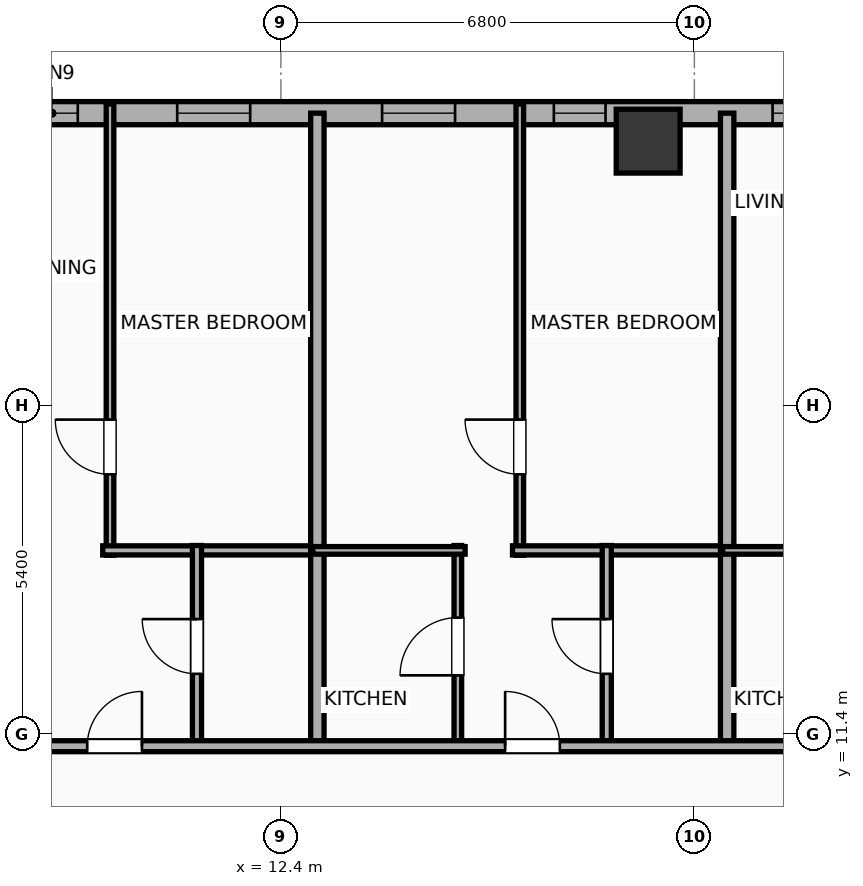
"""IFC4 building model, lengths in metres.
Left out: names, types, materials, properties, quantities, classifications, styles, units other than length and angle.
Written with IfcOpenShell. Run it as: python <this file> out.ifc"""

import sys

from ifc_helpers import new_model, si_unit, direction, frame, frame_2d, origin, origin_2d, place, context, subcontext, project, spatial, rectangle, hollow_rectangle, extrude, element, fill, save


model = new_model("IFC4")
c1 = context("Model", 3, precision=1e-05, world=origin(), true_north=direction((0.0, 1.0)))
c2 = subcontext(c1, "Body", "Model", "MODEL_VIEW")
j1 = project(units=[si_unit("LENGTHUNIT", "METRE"), si_unit("PLANEANGLEUNIT", "RADIAN")], contexts=[c1])
p1 = place(None, origin())
s1 = spatial("IfcSite", under=j1, at=p1, CompositionType="ELEMENT")
p2 = place(p1, origin())
s2 = spatial("IfcBuilding", under=s1, at=p2, CompositionType="ELEMENT")
p3 = place(p2, frame((0.0, 0.0, 120.9)))
s3 = spatial("IfcBuildingStorey", under=s2, at=p3, CompositionType="ELEMENT", Elevation=120.9)
p4 = place(p3, frame((18.44, 21.15, 0.0), z_axis=(0.0, 0.0, 1.0), x_axis=(1.0, 0.0, 0.0)))
e1 = element("IfcColumn", 1, at=p4, inside=s3, PredefinedType="COLUMN", context=c2, shape_type="SweptSolid", body=[
    extrude(hollow_rectangle(XDim=1.05, YDim=1.05, WallThickness=0.036, at=origin_2d()), origin(), (0.0, 0.0, 1.0), 3.9),
])
p5 = place(p3, frame((-25.381, 21.61, 0.0), z_axis=(0.0, 0.0, 1.0), x_axis=(1.0, 0.0, 0.0)))
e2 = element("IfcWall", 2, at=p5, inside=s3, PredefinedType="ELEMENTEDWALL", context=c2, shape_type="SweptSolid", body=[
    extrude(rectangle(XDim=54.763, YDim=0.38, at=frame_2d((27.381, 0.0))), origin(), (0.0, 0.0, 1.0), 3.65),
])
p6 = place(p5, frame((7.295, 0.0, 0.75)))
e3 = element("IfcOpeningElement", 3, at=p6, cuts=e2, PredefinedType="OPENING", context=c2, shape_type="SweptSolid", body=[
    extrude(rectangle(XDim=2.4, YDim=2.1, at=frame_2d((1.2, 1.05))), frame((0.0, 0.2, 0.0), z_axis=(0.0, -1.0, 0.0), x_axis=(1.0, 0.0, 0.0)), (0.0, 0.0, 1.0), 0.4),
])
p7 = place(p5, frame((17.686, 0.0, 0.75)))
e4 = element("IfcOpeningElement", 4, at=p7, cuts=e2, PredefinedType="OPENING", context=c2, shape_type="SweptSolid", body=[
    extrude(rectangle(XDim=2.4, YDim=2.1, at=frame_2d((1.2, 1.05))), frame((0.0, 0.2, 0.0), z_axis=(0.0, -1.0, 0.0), x_axis=(1.0, 0.0, 0.0)), (0.0, 0.0, 1.0), 0.4),
])
p8 = place(p5, frame((45.867, 0.0, 0.75)))
e5 = element("IfcOpeningElement", 5, at=p8, cuts=e2, PredefinedType="OPENING", context=c2, shape_type="SweptSolid", body=[
    extrude(rectangle(XDim=2.4, YDim=2.1, at=frame_2d((1.2, 1.05))), frame((0.0, 0.2, 0.0), z_axis=(0.0, -1.0, 0.0), x_axis=(1.0, 0.0, 0.0)), (0.0, 0.0, 1.0), 0.4),
])
p9 = place(p5, frame((1.481, 0.0, 0.75)))
e6 = element("IfcOpeningElement", 6, at=p9, cuts=e2, PredefinedType="OPENING", context=c2, shape_type="SweptSolid", body=[
    extrude(rectangle(XDim=1.2, YDim=2.05, at=frame_2d((0.6, 1.025))), frame((0.0, 0.2, 0.0), z_axis=(0.0, -1.0, 0.0), x_axis=(1.0, 0.0, 0.0)), (0.0, 0.0, 1.0), 0.4),
])
p10 = place(p5, frame((4.522, 0.0, 0.75)))
e7 = element("IfcOpeningElement", 7, at=p10, cuts=e2, PredefinedType="OPENING", context=c2, shape_type="SweptSolid", body=[
    extrude(rectangle(XDim=1.2, YDim=2.05, at=frame_2d((0.6, 1.025))), frame((0.0, 0.2, 0.0), z_axis=(0.0, -1.0, 0.0), x_axis=(1.0, 0.0, 0.0)), (0.0, 0.0, 1.0), 0.4),
])
p11 = place(p5, frame((11.696, 0.0, 0.75)))
e8 = element("IfcOpeningElement", 8, at=p11, cuts=e2, PredefinedType="OPENING", context=c2, shape_type="SweptSolid", body=[
    extrude(rectangle(XDim=1.2, YDim=2.05, at=frame_2d((0.6, 1.025))), frame((0.0, 0.2, 0.0), z_axis=(0.0, -1.0, 0.0), x_axis=(1.0, 0.0, 0.0)), (0.0, 0.0, 1.0), 0.4),
])
p12 = place(p5, frame((15.076, 0.0, 0.75)))
e9 = element("IfcOpeningElement", 9, at=p12, cuts=e2, PredefinedType="OPENING", context=c2, shape_type="SweptSolid", body=[
    extrude(rectangle(XDim=1.2, YDim=2.05, at=frame_2d((0.6, 1.025))), frame((0.0, 0.2, 0.0), z_axis=(0.0, -1.0, 0.0), x_axis=(1.0, 0.0, 0.0)), (0.0, 0.0, 1.0), 0.4),
])
p13 = place(p5, frame((22.676, 0.0, 0.75)))
e10 = element("IfcOpeningElement", 10, at=p13, cuts=e2, PredefinedType="OPENING", context=c2, shape_type="SweptSolid", body=[
    extrude(rectangle(XDim=1.2, YDim=2.05, at=frame_2d((0.6, 1.025))), frame((0.0, 0.2, 0.0), z_axis=(0.0, -1.0, 0.0), x_axis=(1.0, 0.0, 0.0)), (0.0, 0.0, 1.0), 0.4),
])
p14 = place(p5, frame((25.576, 0.0, 0.75)))
e11 = element("IfcOpeningElement", 11, at=p14, cuts=e2, PredefinedType="OPENING", context=c2, shape_type="SweptSolid", body=[
    extrude(rectangle(XDim=1.2, YDim=2.05, at=frame_2d((0.6, 1.025))), frame((0.0, 0.2, 0.0), z_axis=(0.0, -1.0, 0.0), x_axis=(1.0, 0.0, 0.0)), (0.0, 0.0, 1.0), 0.4),
])
p15 = place(p5, frame((29.076, 0.0, 0.75)))
e12 = element("IfcOpeningElement", 12, at=p15, cuts=e2, PredefinedType="OPENING", context=c2, shape_type="SweptSolid", body=[
    extrude(rectangle(XDim=1.2, YDim=2.05, at=frame_2d((0.6, 1.025))), frame((0.0, 0.2, 0.0), z_axis=(0.0, -1.0, 0.0), x_axis=(1.0, 0.0, 0.0)), (0.0, 0.0, 1.0), 0.4),
])
p16 = place(p5, frame((33.591, 0.0, 0.75)))
e13 = element("IfcOpeningElement", 13, at=p16, cuts=e2, PredefinedType="OPENING", context=c2, shape_type="SweptSolid", body=[
    extrude(rectangle(XDim=0.85, YDim=2.05, at=frame_2d((0.425, 1.025))), frame((0.0, 0.2, 0.0), z_axis=(0.0, -1.0, 0.0), x_axis=(1.0, 0.0, 0.0)), (0.0, 0.0, 1.0), 0.4),
])
p17 = place(p5, frame((36.076, 0.0, 0.75)))
e14 = element("IfcOpeningElement", 14, at=p17, cuts=e2, PredefinedType="OPENING", context=c2, shape_type="SweptSolid", body=[
    extrude(rectangle(XDim=1.2, YDim=2.05, at=frame_2d((0.6, 1.025))), frame((0.0, 0.2, 0.0), z_axis=(0.0, -1.0, 0.0), x_axis=(1.0, 0.0, 0.0)), (0.0, 0.0, 1.0), 0.4),
])
p18 = place(p5, frame((39.446, 0.0, 0.75)))
e15 = element("IfcOpeningElement", 15, at=p18, cuts=e2, PredefinedType="OPENING", context=c2, shape_type="SweptSolid", body=[
    extrude(rectangle(XDim=1.2, YDim=2.05, at=frame_2d((0.6, 1.025))), frame((0.0, 0.2, 0.0), z_axis=(0.0, -1.0, 0.0), x_axis=(1.0, 0.0, 0.0)), (0.0, 0.0, 1.0), 0.4),
])
p19 = place(p5, frame((42.27, 0.0, 0.75)))
e16 = element("IfcOpeningElement", 16, at=p19, cuts=e2, PredefinedType="OPENING", context=c2, shape_type="SweptSolid", body=[
    extrude(rectangle(XDim=0.85, YDim=2.05, at=frame_2d((0.425, 1.025))), frame((0.0, 0.2, 0.0), z_axis=(0.0, -1.0, 0.0), x_axis=(1.0, 0.0, 0.0)), (0.0, 0.0, 1.0), 0.4),
])
p20 = place(p5, frame((49.554, 0.0, 0.75)))
e17 = element("IfcOpeningElement", 17, at=p20, cuts=e2, PredefinedType="OPENING", context=c2, shape_type="SweptSolid", body=[
    extrude(rectangle(XDim=1.2, YDim=2.05, at=frame_2d((0.6, 1.025))), frame((0.0, 0.2, 0.0), z_axis=(0.0, -1.0, 0.0), x_axis=(1.0, 0.0, 0.0)), (0.0, 0.0, 1.0), 0.4),
])
p21 = place(p5, frame((52.266, 0.0, 0.75)))
e18 = element("IfcOpeningElement", 18, at=p21, cuts=e2, PredefinedType="OPENING", context=c2, shape_type="SweptSolid", body=[
    extrude(rectangle(XDim=1.2, YDim=2.05, at=frame_2d((0.6, 1.025))), frame((0.0, 0.2, 0.0), z_axis=(0.0, -1.0, 0.0), x_axis=(1.0, 0.0, 0.0)), (0.0, 0.0, 1.0), 0.4),
])
p22 = place(p3, frame((9.59, 14.34, 0.0), z_axis=(0.0, 0.0, 1.0), x_axis=(0.0, 1.0, 0.0)))
e19 = element("IfcWall", 19, at=p22, inside=s3, PredefinedType="PARTITIONING", context=c2, shape_type="SweptSolid", body=[
    extrude(rectangle(XDim=7.42, YDim=0.125, at=frame_2d((3.71, 0.0))), origin(), (0.0, 0.0, 1.0), 3.65),
])
p23 = place(p22, frame((1.331, 0.0, 0.0)))
e20 = element("IfcOpeningElement", 20, at=p23, cuts=e19, PredefinedType="OPENING", context=c2, shape_type="SweptSolid", body=[
    extrude(rectangle(XDim=0.9, YDim=2.05, at=frame_2d((0.45, 1.025))), frame((0.0, 0.073, 0.0), z_axis=(0.0, -1.0, 0.0), x_axis=(1.0, 0.0, 0.0)), (0.0, 0.0, 1.0), 0.145),
])
p24 = place(p3, frame((9.47, 14.42, 0.0), z_axis=(0.0, 0.0, 1.0), x_axis=(1.0, 0.0, 0.0)))
e21 = element("IfcWall", 21, at=p24, inside=s3, PredefinedType="PLUMBINGWALL", context=c2, shape_type="SweptSolid", body=[
    extrude(rectangle(XDim=3.605, YDim=0.15, at=frame_2d((1.802, 0.0))), origin(), (0.0, 0.0, 1.0), 3.65),
])
p25 = place(p3, frame((11.02, 11.18, 0.0), z_axis=(0.0, 0.0, 1.0), x_axis=(0.0, 1.0, 0.0)))
e22 = element("IfcWall", 22, at=p25, inside=s3, PredefinedType="PLUMBINGWALL", context=c2, shape_type="SweptSolid", body=[
    extrude(rectangle(XDim=3.32, YDim=0.15, at=frame_2d((1.66, 0.0))), origin(), (0.0, 0.0, 1.0), 3.65),
])
p26 = place(p25, frame((1.21, 0.0, 0.0)))
e23 = element("IfcOpeningElement", 23, at=p26, cuts=e22, PredefinedType="OPENING", context=c2, shape_type="SweptSolid", body=[
    extrude(rectangle(XDim=0.9, YDim=2.05, at=frame_2d((0.45, 1.025))), frame((0.0, 0.085, 0.0), z_axis=(0.0, -1.0, 0.0), x_axis=(1.0, 0.0, 0.0)), (0.0, 0.0, 1.0), 0.17),
])
p27 = place(p3, frame((13.0, 11.12, 0.0), z_axis=(0.0, 0.0, 1.0), x_axis=(0.0, 1.0, 0.0)))
e24 = element("IfcWall", 24, at=p27, inside=s3, PredefinedType="PARTITIONING", context=c2, shape_type="SweptSolid", body=[
    extrude(rectangle(XDim=10.49, YDim=0.22, at=frame_2d((5.245, 0.0))), origin(), (0.0, 0.0, 1.0), 3.65),
])
p28 = place(p3, frame((16.329, 14.34, 0.0), z_axis=(0.0, 0.0, 1.0), x_axis=(0.0, 1.0, 0.0)))
e25 = element("IfcWall", 25, at=p28, inside=s3, PredefinedType="PARTITIONING", context=c2, shape_type="SweptSolid", body=[
    extrude(rectangle(XDim=7.42, YDim=0.125, at=frame_2d((3.71, 0.0))), origin(), (0.0, 0.0, 1.0), 3.65),
])
p29 = place(p28, frame((1.331, 0.0, 0.0)))
e26 = element("IfcOpeningElement", 26, at=p29, cuts=e25, PredefinedType="OPENING", context=c2, shape_type="SweptSolid", body=[
    extrude(rectangle(XDim=0.9, YDim=2.05, at=frame_2d((0.45, 1.025))), frame((0.0, 0.073, 0.0), z_axis=(0.0, -1.0, 0.0), x_axis=(1.0, 0.0, 0.0)), (0.0, 0.0, 1.0), 0.145),
])
p30 = place(p3, frame((16.209, 14.42, 0.0), z_axis=(0.0, 0.0, 1.0), x_axis=(1.0, 0.0, 0.0)))
e27 = element("IfcWall", 27, at=p30, inside=s3, PredefinedType="PLUMBINGWALL", context=c2, shape_type="SweptSolid", body=[
    extrude(rectangle(XDim=3.605, YDim=0.15, at=frame_2d((1.802, 0.0))), origin(), (0.0, 0.0, 1.0), 3.65),
])
p31 = place(p3, frame((15.31, 11.18, 0.0), z_axis=(0.0, 0.0, 1.0), x_axis=(0.0, 1.0, 0.0)))
e28 = element("IfcWall", 28, at=p31, inside=s3, PredefinedType="PARTITIONING", context=c2, shape_type="SweptSolid", body=[
    extrude(rectangle(XDim=3.32, YDim=0.125, at=frame_2d((1.66, 0.0))), origin(), (0.0, 0.0, 1.0), 3.65),
])
p32 = place(p31, frame((1.185, 0.0, 0.0)))
e29 = element("IfcOpeningElement", 29, at=p32, cuts=e28, PredefinedType="OPENING", context=c2, shape_type="SweptSolid", body=[
    extrude(rectangle(XDim=0.95, YDim=2.05, at=frame_2d((0.475, 1.025))), frame((0.0, 0.073, 0.0), z_axis=(0.0, -1.0, 0.0), x_axis=(1.0, 0.0, 0.0)), (0.0, 0.0, 1.0), 0.145),
])
p33 = place(p3, frame((12.925, 14.42, 0.0), z_axis=(0.0, 0.0, 1.0), x_axis=(1.0, 0.0, 0.0)))
e30 = element("IfcWall", 30, at=p33, inside=s3, PredefinedType="PARTITIONING", context=c2, shape_type="SweptSolid", body=[
    extrude(rectangle(XDim=2.505, YDim=0.125, at=frame_2d((1.252, 0.0))), origin(), (0.0, 0.0, 1.0), 3.65),
])
p34 = place(p3, frame((17.759, 11.18, 0.0), z_axis=(0.0, 0.0, 1.0), x_axis=(0.0, 1.0, 0.0)))
e31 = element("IfcWall", 31, at=p34, inside=s3, PredefinedType="PLUMBINGWALL", context=c2, shape_type="SweptSolid", body=[
    extrude(rectangle(XDim=3.32, YDim=0.15, at=frame_2d((1.66, 0.0))), origin(), (0.0, 0.0, 1.0), 3.65),
])
p35 = place(p34, frame((1.21, 0.0, 0.0)))
e32 = element("IfcOpeningElement", 32, at=p35, cuts=e31, PredefinedType="OPENING", context=c2, shape_type="SweptSolid", body=[
    extrude(rectangle(XDim=0.9, YDim=2.05, at=frame_2d((0.45, 1.025))), frame((0.0, 0.085, 0.0), z_axis=(0.0, -1.0, 0.0), x_axis=(1.0, 0.0, 0.0)), (0.0, 0.0, 1.0), 0.17),
])
p36 = place(p3, frame((19.739, 11.12, 0.0), z_axis=(0.0, 0.0, 1.0), x_axis=(0.0, 1.0, 0.0)))
e33 = element("IfcWall", 33, at=p36, inside=s3, PredefinedType="PARTITIONING", context=c2, shape_type="SweptSolid", body=[
    extrude(rectangle(XDim=10.49, YDim=0.22, at=frame_2d((5.245, 0.0))), origin(), (0.0, 0.0, 1.0), 3.65),
])
p37 = place(p3, frame((19.664, 14.42, 0.0), z_axis=(0.0, 0.0, 1.0), x_axis=(1.0, 0.0, 0.0)))
e34 = element("IfcWall", 34, at=p37, inside=s3, PredefinedType="PARTITIONING", context=c2, shape_type="SweptSolid", body=[
    extrude(rectangle(XDim=2.505, YDim=0.125, at=frame_2d((1.252, 0.0))), origin(), (0.0, 0.0, 1.0), 3.65),
])
p38 = place(p3, frame((-29.21, 11.2, 0.0), z_axis=(0.0, 0.0, 1.0), x_axis=(1.0, 0.0, 0.0)))
e35 = element("IfcWall", 35, at=p38, inside=s3, PredefinedType="PARTITIONING", context=c2, shape_type="SweptSolid", body=[
    extrude(rectangle(XDim=62.42, YDim=0.18, at=frame_2d((31.21, 0.0))), origin(), (0.0, 0.0, 1.0), 3.65),
])
p39 = place(p38, frame((3.108, 0.0, 0.0)))
e36 = element("IfcOpeningElement", 36, at=p39, cuts=e35, PredefinedType="OPENING", context=c2, shape_type="SweptSolid", body=[
    extrude(rectangle(XDim=1.15, YDim=2.05, at=frame_2d((0.575, 1.025))), frame((0.0, 0.1, 0.0), z_axis=(0.0, -1.0, 0.0), x_axis=(1.0, 0.0, 0.0)), (0.0, 0.0, 1.0), 0.2),
])
p40 = place(p38, frame((10.242, 0.0, 0.0)))
e37 = element("IfcOpeningElement", 37, at=p40, cuts=e35, PredefinedType="OPENING", context=c2, shape_type="SweptSolid", body=[
    extrude(rectangle(XDim=1.15, YDim=2.05, at=frame_2d((0.575, 1.025))), frame((0.0, 0.1, 0.0), z_axis=(0.0, -1.0, 0.0), x_axis=(1.0, 0.0, 0.0)), (0.0, 0.0, 1.0), 0.2),
])
p41 = place(p38, frame((17.427, 0.0, 0.0)))
e38 = element("IfcOpeningElement", 38, at=p41, cuts=e35, PredefinedType="OPENING", context=c2, shape_type="SweptSolid", body=[
    extrude(rectangle(XDim=0.9, YDim=2.05, at=frame_2d((0.45, 1.025))), frame((0.0, 0.1, 0.0), z_axis=(0.0, -1.0, 0.0), x_axis=(1.0, 0.0, 0.0)), (0.0, 0.0, 1.0), 0.2),
])
p42 = place(p38, frame((24.424, 0.0, 0.0)))
e39 = element("IfcOpeningElement", 39, at=p42, cuts=e35, PredefinedType="OPENING", context=c2, shape_type="SweptSolid", body=[
    extrude(rectangle(XDim=0.9, YDim=2.05, at=frame_2d((0.45, 1.025))), frame((0.0, 0.1, 0.0), z_axis=(0.0, -1.0, 0.0), x_axis=(1.0, 0.0, 0.0)), (0.0, 0.0, 1.0), 0.2),
])
p43 = place(p38, frame((31.428, 0.0, 0.0)))
e40 = element("IfcOpeningElement", 40, at=p43, cuts=e35, PredefinedType="OPENING", context=c2, shape_type="SweptSolid", body=[
    extrude(rectangle(XDim=0.9, YDim=2.05, at=frame_2d((0.45, 1.025))), frame((0.0, 0.1, 0.0), z_axis=(0.0, -1.0, 0.0), x_axis=(1.0, 0.0, 0.0)), (0.0, 0.0, 1.0), 0.2),
])
p44 = place(p38, frame((38.425, 0.0, 0.0)))
e41 = element("IfcOpeningElement", 41, at=p44, cuts=e35, PredefinedType="OPENING", context=c2, shape_type="SweptSolid", body=[
    extrude(rectangle(XDim=0.9, YDim=2.05, at=frame_2d((0.45, 1.025))), frame((0.0, 0.1, 0.0), z_axis=(0.0, -1.0, 0.0), x_axis=(1.0, 0.0, 0.0)), (0.0, 0.0, 1.0), 0.2),
])
p45 = place(p38, frame((45.298, 0.0, 0.0)))
e42 = element("IfcOpeningElement", 42, at=p45, cuts=e35, PredefinedType="OPENING", context=c2, shape_type="SweptSolid", body=[
    extrude(rectangle(XDim=0.9, YDim=2.05, at=frame_2d((0.45, 1.025))), frame((0.0, 0.1, 0.0), z_axis=(0.0, -1.0, 0.0), x_axis=(1.0, 0.0, 0.0)), (0.0, 0.0, 1.0), 0.2),
])
p46 = place(p38, frame((52.033, 0.0, 0.0)))
e43 = element("IfcOpeningElement", 43, at=p46, cuts=e35, PredefinedType="OPENING", context=c2, shape_type="SweptSolid", body=[
    extrude(rectangle(XDim=0.9, YDim=2.05, at=frame_2d((0.45, 1.025))), frame((0.0, 0.1, 0.0), z_axis=(0.0, -1.0, 0.0), x_axis=(1.0, 0.0, 0.0)), (0.0, 0.0, 1.0), 0.2),
])
p47 = place(p38, frame((58.805, 0.0, 0.0)))
e44 = element("IfcOpeningElement", 44, at=p47, cuts=e35, PredefinedType="OPENING", context=c2, shape_type="SweptSolid", body=[
    extrude(rectangle(XDim=0.9, YDim=2.05, at=frame_2d((0.45, 1.025))), frame((0.0, 0.1, 0.0), z_axis=(0.0, -1.0, 0.0), x_axis=(1.0, 0.0, 0.0)), (0.0, 0.0, 1.0), 0.2),
])
p48 = place(p8, origin())
e45 = element("IfcWindow", 45, at=p48, inside=s3, PartitioningType="SINGLE_PANEL", PredefinedType="WINDOW", context=c2, shape_type="SweptSolid", body=[
    extrude(rectangle(XDim=2.4, YDim=2.1, at=frame_2d((1.2, 1.05))), frame((0.0, 0.03, 0.0), z_axis=(0.0, -1.0, 0.0), x_axis=(1.0, 0.0, 0.0)), (0.0, 0.0, 1.0), 0.06),
])
fill(e5, e45)
p49 = place(p16, origin())
e46 = element("IfcWindow", 46, at=p49, inside=s3, PartitioningType="SINGLE_PANEL", PredefinedType="WINDOW", context=c2, shape_type="SweptSolid", body=[
    extrude(rectangle(XDim=0.85, YDim=2.05, at=frame_2d((0.425, 1.025))), frame((0.0, 0.03, 0.0), z_axis=(0.0, -1.0, 0.0), x_axis=(1.0, 0.0, 0.0)), (0.0, 0.0, 1.0), 0.06),
])
fill(e13, e46)
p50 = place(p17, origin())
e47 = element("IfcWindow", 47, at=p50, inside=s3, PartitioningType="SINGLE_PANEL", PredefinedType="WINDOW", context=c2, shape_type="SweptSolid", body=[
    extrude(rectangle(XDim=1.2, YDim=2.05, at=frame_2d((0.6, 1.025))), frame((0.0, 0.03, 0.0), z_axis=(0.0, -1.0, 0.0), x_axis=(1.0, 0.0, 0.0)), (0.0, 0.0, 1.0), 0.06),
])
fill(e14, e47)
p51 = place(p18, origin())
e48 = element("IfcWindow", 48, at=p51, inside=s3, PartitioningType="SINGLE_PANEL", PredefinedType="WINDOW", context=c2, shape_type="SweptSolid", body=[
    extrude(rectangle(XDim=1.2, YDim=2.05, at=frame_2d((0.6, 1.025))), frame((0.0, 0.03, 0.0), z_axis=(0.0, -1.0, 0.0), x_axis=(1.0, 0.0, 0.0)), (0.0, 0.0, 1.0), 0.06),
])
fill(e15, e48)
p52 = place(p19, origin())
e49 = element("IfcWindow", 49, at=p52, inside=s3, PartitioningType="SINGLE_PANEL", PredefinedType="WINDOW", context=c2, shape_type="SweptSolid", body=[
    extrude(rectangle(XDim=0.85, YDim=2.05, at=frame_2d((0.425, 1.025))), frame((0.0, 0.03, 0.0), z_axis=(0.0, -1.0, 0.0), x_axis=(1.0, 0.0, 0.0)), (0.0, 0.0, 1.0), 0.06),
])
fill(e16, e49)
p53 = place(p23, origin())
e50 = element("IfcDoor", 50, at=p53, inside=s3, OperationType="SINGLE_SWING_RIGHT", PredefinedType="DOOR", context=c2, shape_type="SweptSolid", body=[
    extrude(rectangle(XDim=0.9, YDim=2.05, at=frame_2d((0.45, 1.025))), frame((0.0, 0.025, 0.0), z_axis=(0.0, -1.0, 0.0), x_axis=(1.0, 0.0, 0.0)), (0.0, 0.0, 1.0), 0.05),
])
fill(e20, e50)
p54 = place(p26, origin())
e51 = element("IfcDoor", 51, at=p54, inside=s3, OperationType="SINGLE_SWING_RIGHT", PredefinedType="DOOR", context=c2, shape_type="SweptSolid", body=[
    extrude(rectangle(XDim=0.9, YDim=2.05, at=frame_2d((0.45, 1.025))), frame((0.0, 0.025, 0.0), z_axis=(0.0, -1.0, 0.0), x_axis=(1.0, 0.0, 0.0)), (0.0, 0.0, 1.0), 0.05),
])
fill(e23, e51)
p55 = place(p29, origin())
e52 = element("IfcDoor", 52, at=p55, inside=s3, OperationType="SINGLE_SWING_RIGHT", PredefinedType="DOOR", context=c2, shape_type="SweptSolid", body=[
    extrude(rectangle(XDim=0.9, YDim=2.05, at=frame_2d((0.45, 1.025))), frame((0.0, 0.025, 0.0), z_axis=(0.0, -1.0, 0.0), x_axis=(1.0, 0.0, 0.0)), (0.0, 0.0, 1.0), 0.05),
])
fill(e26, e52)
p56 = place(p32, origin())
e53 = element("IfcDoor", 53, at=p56, inside=s3, OperationType="SINGLE_SWING_LEFT", PredefinedType="DOOR", context=c2, shape_type="SweptSolid", body=[
    extrude(rectangle(XDim=0.95, YDim=2.05, at=frame_2d((0.475, 1.025))), frame((0.0, 0.025, 0.0), z_axis=(0.0, -1.0, 0.0), x_axis=(1.0, 0.0, 0.0)), (0.0, 0.0, 1.0), 0.05),
])
fill(e29, e53)
p57 = place(p35, origin())
e54 = element("IfcDoor", 54, at=p57, inside=s3, OperationType="SINGLE_SWING_RIGHT", PredefinedType="DOOR", context=c2, shape_type="SweptSolid", body=[
    extrude(rectangle(XDim=0.9, YDim=2.05, at=frame_2d((0.45, 1.025))), frame((0.0, 0.025, 0.0), z_axis=(0.0, -1.0, 0.0), x_axis=(1.0, 0.0, 0.0)), (0.0, 0.0, 1.0), 0.05),
])
fill(e32, e54)
p58 = place(p44, origin())
e55 = element("IfcDoor", 55, at=p58, inside=s3, OperationType="SINGLE_SWING_RIGHT", PredefinedType="DOOR", context=c2, shape_type="SweptSolid", body=[
    extrude(rectangle(XDim=0.9, YDim=2.05, at=frame_2d((0.45, 1.025))), frame((0.0, 0.025, 0.0), z_axis=(0.0, -1.0, 0.0), x_axis=(1.0, 0.0, 0.0)), (0.0, 0.0, 1.0), 0.05),
])
fill(e41, e55)
p59 = place(p45, origin())
e56 = element("IfcDoor", 56, at=p59, inside=s3, OperationType="SINGLE_SWING_LEFT", PredefinedType="DOOR", context=c2, shape_type="SweptSolid", body=[
    extrude(rectangle(XDim=0.9, YDim=2.05, at=frame_2d((0.45, 1.025))), frame((0.0, 0.025, 0.0), z_axis=(0.0, -1.0, 0.0), x_axis=(1.0, 0.0, 0.0)), (0.0, 0.0, 1.0), 0.05),
])
fill(e42, e56)
save(model, sys.argv[1])
